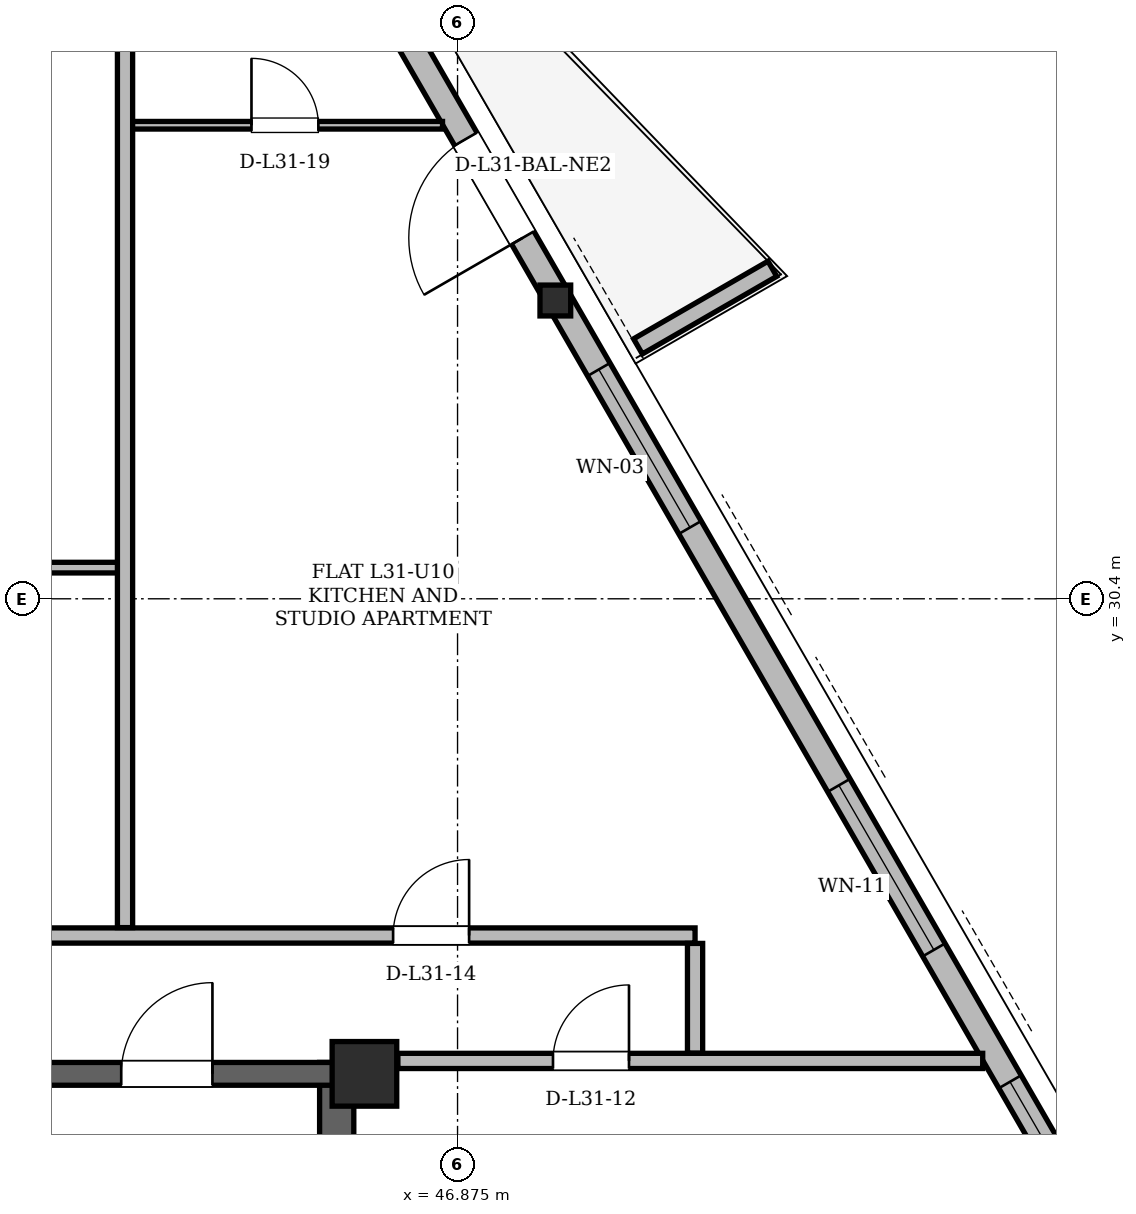
"""IFC4 building model, lengths in metres.
Left out: names, types, materials, properties, quantities, classifications, styles, units other than length and angle.
Written with IfcOpenShell. Run it as: python <this file> out.ifc"""

import sys

from ifc_helpers import new_model, si_unit, direction, frame, frame_2d, origin, origin_2d, place, context, subcontext, project, spatial, polyline, rectangle, hollow_rectangle, i_section, outline, extrude, element, fill, save


model = new_model("IFC4")
c1 = context("Model", 3, precision=1e-05, world=origin(), true_north=direction((0.0, 1.0)))
c2 = subcontext(c1, "Body", "Model", "MODEL_VIEW")
j1 = project(units=[si_unit("LENGTHUNIT", "METRE"), si_unit("PLANEANGLEUNIT", "RADIAN")], contexts=[c1])
p1 = place(None, origin())
s1 = spatial("IfcSite", under=j1, at=p1, CompositionType="ELEMENT")
p2 = place(p1, origin())
s2 = spatial("IfcBuilding", under=s1, at=p2, CompositionType="ELEMENT")
p3 = place(p2, frame((0.0, 0.0, 119.4)))
s3 = spatial("IfcBuildingStorey", under=s2, at=p3, CompositionType="ELEMENT", Elevation=119.4)
p4 = place(p3, frame((45.65, 24.15, 0.0), z_axis=(0.0, 0.0, 1.0), x_axis=(1.0, 0.0, 0.0)))
e1 = element("IfcColumn", 1, at=p4, inside=s3, PredefinedType="COLUMN", context=c2, shape_type="SweptSolid", body=[
    extrude(hollow_rectangle(XDim=0.85, YDim=0.85, WallThickness=0.07, at=origin_2d()), origin(), (0.0, 0.0, 1.0), 3.6),
])
p5 = place(p3, frame((48.201, 34.338, 0.005), z_axis=(-0.022089225815, -0.007952121293, 0.999724376951), x_axis=(0.338719468273, -0.940887411869, 0.0)))
e2 = element("IfcColumn", 2, at=p5, inside=s3, PredefinedType="COLUMN", context=c2, shape_type="SweptSolid", body=[
    extrude(i_section(OverallWidth=0.404, OverallDepth=0.406, WebThickness=0.027, FlangeThickness=0.044, at=origin_2d()), origin(), (0.0, 0.0, 1.0), 3.592),
])
p6 = place(p3, frame((45.285, 11.0, 0.0), z_axis=(0.0, 0.0, 1.0), x_axis=(0.0, 1.0, 0.0)))
e3 = element("IfcWall", 3, at=p6, inside=s3, PredefinedType="SHEAR", context=c2, shape_type="SweptSolid", body=[
    extrude(rectangle(XDim=13.3, YDim=0.45, at=frame_2d((6.65, 0.0))), origin(), (0.0, 0.0, 1.0), 3.36),
])
p7 = place(p3, frame((29.65, 24.15, 0.0), z_axis=(0.0, 0.0, 1.0), x_axis=(1.0, 0.0, 0.0)))
e4 = element("IfcWall", 4, at=p7, inside=s3, PredefinedType="SHEAR", context=c2, shape_type="SweptSolid", body=[
    extrude(rectangle(XDim=15.7, YDim=0.3, at=frame_2d((7.85, 0.0))), origin(), (0.0, 0.0, 1.0), 3.36),
])
p8 = place(p7, frame((1.7, 0.0, 0.0)))
e5 = element("IfcOpeningElement", 5, at=p8, cuts=e4, PredefinedType="OPENING", context=c2, shape_type="SweptSolid", body=[
    extrude(rectangle(XDim=1.2, YDim=2.2, at=frame_2d((0.6, 1.1))), frame((0.0, 0.15, 0.0), z_axis=(0.0, -1.0, 0.0), x_axis=(1.0, 0.0, 0.0)), (0.0, 0.0, 1.0), 0.3),
])
p9 = place(p7, frame((12.8, 0.0, 0.0)))
e6 = element("IfcOpeningElement", 6, at=p9, cuts=e4, PredefinedType="OPENING", context=c2, shape_type="SweptSolid", body=[
    extrude(rectangle(XDim=1.2, YDim=2.2, at=frame_2d((0.6, 1.1))), frame((0.0, 0.15, 0.0), z_axis=(0.0, -1.0, 0.0), x_axis=(1.0, 0.0, 0.0)), (0.0, 0.0, 1.0), 0.3),
])
p10 = place(p7, frame((6.55, 0.0, 0.0)))
e7 = element("IfcOpeningElement", 7, at=p10, cuts=e4, PredefinedType="OPENING", context=c2, shape_type="SweptSolid", body=[
    extrude(rectangle(XDim=0.9, YDim=2.05, at=frame_2d((0.45, 1.025))), frame((0.0, 0.15, 0.0), z_axis=(0.0, -1.0, 0.0), x_axis=(1.0, 0.0, 0.0)), (0.0, 0.0, 1.0), 0.3),
])
p11 = place(p7, frame((8.45, 0.0, 0.0)))
e8 = element("IfcOpeningElement", 8, at=p11, cuts=e4, PredefinedType="OPENING", context=c2, shape_type="SweptSolid", body=[
    extrude(rectangle(XDim=0.9, YDim=2.05, at=frame_2d((0.45, 1.025))), frame((0.0, 0.15, 0.0), z_axis=(0.0, -1.0, 0.0), x_axis=(1.0, 0.0, 0.0)), (0.0, 0.0, 1.0), 0.3),
])
p12 = place(p3, frame((60.417, 13.181, 0.0), z_axis=(0.0, 0.0, 1.0), x_axis=(-0.499998569178, 0.866026229868, 0.0)))
e9 = element("IfcWall", 9, at=p12, inside=s3, PredefinedType="SOLIDWALL", context=c2, shape_type="SweptSolid", body=[
    extrude(rectangle(XDim=34.901, YDim=0.34, at=frame_2d((17.451, 0.0))), origin(), (0.0, 0.0, 1.0), 2.578),
])
p13 = place(p12, frame((6.369, 0.0, 0.0)))
e10 = element("IfcOpeningElement", 10, at=p13, cuts=e9, PredefinedType="OPENING", context=c2, shape_type="SweptSolid", body=[
    extrude(rectangle(XDim=1.5, YDim=2.2, at=frame_2d((0.75, 1.1))), frame((0.0, 0.17, 0.0), z_axis=(0.0, -1.0, 0.0), x_axis=(1.0, 0.0, 0.0)), (0.0, 0.0, 1.0), 0.34),
])
p14 = place(p12, frame((25.367, 0.0, 0.0)))
e11 = element("IfcOpeningElement", 11, at=p14, cuts=e9, PredefinedType="OPENING", context=c2, shape_type="SweptSolid", body=[
    extrude(rectangle(XDim=1.5, YDim=2.2, at=frame_2d((0.75, 1.1))), frame((0.0, 0.17, 0.0), z_axis=(0.0, -1.0, 0.0), x_axis=(1.0, 0.0, 0.0)), (0.0, 0.0, 1.0), 0.34),
])
p15 = place(p12, frame((3.309, 0.0, 0.85)))
e12 = element("IfcOpeningElement", 12, at=p15, cuts=e9, PredefinedType="OPENING", context=c2, shape_type="SweptSolid", body=[
    extrude(rectangle(XDim=1.2, YDim=1.48, at=frame_2d((0.6, 0.74))), frame((0.0, 0.17, 0.0), z_axis=(0.0, -1.0, 0.0), x_axis=(1.0, 0.0, 0.0)), (0.0, 0.0, 1.0), 0.34),
])
p16 = place(p12, frame((11.346, 0.0, 0.85)))
e13 = element("IfcOpeningElement", 13, at=p16, cuts=e9, PredefinedType="OPENING", context=c2, shape_type="SweptSolid", body=[
    extrude(rectangle(XDim=1.2, YDim=1.48, at=frame_2d((0.6, 0.74))), frame((0.0, 0.17, 0.0), z_axis=(0.0, -1.0, 0.0), x_axis=(1.0, 0.0, 0.0)), (0.0, 0.0, 1.0), 0.34),
])
p17 = place(p12, frame((32.719, 0.0, 0.85)))
e14 = element("IfcOpeningElement", 14, at=p17, cuts=e9, PredefinedType="OPENING", context=c2, shape_type="SweptSolid", body=[
    extrude(rectangle(XDim=1.2, YDim=1.48, at=frame_2d((0.6, 0.74))), frame((0.0, 0.17, 0.0), z_axis=(0.0, -1.0, 0.0), x_axis=(1.0, 0.0, 0.0)), (0.0, 0.0, 1.0), 0.34),
])
p18 = place(p12, frame((14.549, 0.0, 0.85)))
e15 = element("IfcOpeningElement", 15, at=p18, cuts=e9, PredefinedType="OPENING", context=c2, shape_type="SweptSolid", body=[
    extrude(rectangle(XDim=2.5, YDim=1.618, at=frame_2d((1.25, 0.809))), frame((0.0, 0.17, 0.0), z_axis=(0.0, -1.0, 0.0), x_axis=(1.0, 0.0, 0.0)), (0.0, 0.0, 1.0), 0.34),
])
p19 = place(p12, frame((20.967, 0.0, 0.85)))
e16 = element("IfcOpeningElement", 16, at=p19, cuts=e9, PredefinedType="OPENING", context=c2, shape_type="SweptSolid", body=[
    extrude(rectangle(XDim=2.4, YDim=1.618, at=frame_2d((1.2, 0.809))), frame((0.0, 0.17, 0.0), z_axis=(0.0, -1.0, 0.0), x_axis=(1.0, 0.0, 0.0)), (0.0, 0.0, 1.0), 0.34),
])
p20 = place(p12, frame((30.927, 0.0, 0.85)))
e17 = element("IfcOpeningElement", 17, at=p20, cuts=e9, PredefinedType="OPENING", context=c2, shape_type="SweptSolid", body=[
    extrude(rectangle(XDim=1.2, YDim=1.48, at=frame_2d((0.6, 0.74))), frame((0.0, 0.17, 0.0), z_axis=(0.0, -1.0, 0.0), x_axis=(1.0, 0.0, 0.0)), (0.0, 0.0, 1.0), 0.34),
])
p21 = place(p3, frame((49.249, 33.72, 0.0), z_axis=(0.0, 0.0, 1.0), x_axis=(0.866012356593, 0.500022597718, 0.0)))
e18 = element("IfcWall", 18, at=p21, inside=s3, PredefinedType="PARAPET", context=c2, shape_type="SweptSolid", body=[
    extrude(outline(polyline([(0.0, 0.0), (2.042, 0.0), (2.042, 1.1), (0.0, 1.32), (0.0, 0.0)])), frame((0.0, 0.115, 0.0), z_axis=(0.0, -1.0, 0.0), x_axis=(1.0, 0.0, 0.0)), (0.0, 0.0, 1.0), 0.23),
])
p22 = place(p3, frame((46.09, 24.32, 0.0), z_axis=(0.0, 0.0, 1.0), x_axis=(1.0, 0.0, 0.0)))
e19 = element("IfcWall", 19, at=p22, inside=s3, PredefinedType="PARTITIONING", context=c2, shape_type="SweptSolid", body=[
    extrude(rectangle(XDim=7.695, YDim=0.2, at=frame_2d((3.847, 0.0))), origin(), (0.0, 0.0, 1.0), 2.946),
])
p23 = place(p22, frame((2.041, 0.0, 0.0)))
e20 = element("IfcOpeningElement", 20, at=p23, cuts=e19, PredefinedType="OPENING", context=c2, shape_type="SweptSolid", body=[
    extrude(rectangle(XDim=1.0, YDim=2.18, at=frame_2d((0.5, 1.09))), frame((0.0, 0.1, 0.0), z_axis=(0.0, -1.0, 0.0), x_axis=(1.0, 0.0, 0.0)), (0.0, 0.0, 1.0), 0.2),
])
p24 = place(p3, frame((38.3, 25.97, 0.0), z_axis=(0.0, 0.0, 1.0), x_axis=(1.0, 0.0, 0.0)))
e21 = element("IfcWall", 21, at=p24, inside=s3, PredefinedType="PARTITIONING", context=c2, shape_type="SweptSolid", body=[
    extrude(rectangle(XDim=11.7, YDim=0.2, at=frame_2d((5.85, 0.0))), origin(), (0.0, 0.0, 1.0), 2.814),
])
p25 = place(p24, frame((7.727, 0.0, 0.0)))
e22 = element("IfcOpeningElement", 22, at=p25, cuts=e21, PredefinedType="OPENING", context=c2, shape_type="SweptSolid", body=[
    extrude(rectangle(XDim=1.0, YDim=2.18, at=frame_2d((0.5, 1.09))), frame((0.0, 0.1, 0.0), z_axis=(0.0, -1.0, 0.0), x_axis=(1.0, 0.0, 0.0)), (0.0, 0.0, 1.0), 0.2),
])
p26 = place(p3, frame((38.218, 30.81, 0.0), z_axis=(0.0, 0.0, 1.0), x_axis=(1.0, 0.0, 0.0)))
e23 = element("IfcWall", 23, at=p26, inside=s3, PredefinedType="PARTITIONING", context=c2, shape_type="SweptSolid", body=[
    extrude(rectangle(XDim=4.364, YDim=0.14, at=frame_2d((2.182, 0.0))), origin(), (0.0, 0.0, 1.0), 3.36),
])
p27 = place(p26, frame((1.742, 0.0, 0.0)))
e24 = element("IfcOpeningElement", 24, at=p27, cuts=e23, PredefinedType="OPENING", context=c2, shape_type="SweptSolid", body=[
    extrude(rectangle(XDim=0.88, YDim=2.08, at=frame_2d((0.44, 1.04))), frame((0.0, 0.07, 0.0), z_axis=(0.0, -1.0, 0.0), x_axis=(1.0, 0.0, 0.0)), (0.0, 0.0, 1.0), 0.14),
])
p28 = place(p3, frame((42.418, 36.63, 0.0), z_axis=(0.0, 0.0, 1.0), x_axis=(1.0, 0.0, 0.0)))
e25 = element("IfcWall", 25, at=p28, inside=s3, PredefinedType="PARTITIONING", context=c2, shape_type="SweptSolid", body=[
    extrude(rectangle(XDim=4.26, YDim=0.1, at=frame_2d((2.13, 0.0))), origin(), (0.0, 0.0, 1.0), 2.814),
])
p29 = place(p28, frame((1.746, 0.0, 0.0)))
e26 = element("IfcOpeningElement", 26, at=p29, cuts=e25, PredefinedType="OPENING", context=c2, shape_type="SweptSolid", body=[
    extrude(rectangle(XDim=0.88, YDim=2.08, at=frame_2d((0.44, 1.04))), frame((0.0, 0.05, 0.0), z_axis=(0.0, -1.0, 0.0), x_axis=(1.0, 0.0, 0.0)), (0.0, 0.0, 1.0), 0.1),
])
p30 = place(p3, frame((42.5, 26.074, 0.0), z_axis=(0.0, 0.0, 1.0), x_axis=(0.0, 1.0, 0.0)))
e27 = element("IfcWall", 27, at=p30, inside=s3, PredefinedType="PARTITIONING", context=c2, shape_type="SweptSolid", body=[
    extrude(rectangle(XDim=17.158, YDim=0.2, at=frame_2d((8.579, 0.0))), origin(), (0.0, 0.0, 1.0), 3.36),
])
p31 = place(p3, frame((50.0, 24.424, 0.0), z_axis=(0.0, 0.0, 1.0), x_axis=(0.0, 1.0, 0.0)))
e28 = element("IfcWall", 28, at=p31, inside=s3, PredefinedType="PARTITIONING", context=c2, shape_type="SweptSolid", body=[
    extrude(rectangle(XDim=1.442, YDim=0.2, at=frame_2d((0.721, 0.0))), origin(), (0.0, 0.0, 1.0), 3.36),
])
p32 = place(p14, origin())
e29 = element("IfcDoor", 29, at=p32, inside=s3, OperationType="SINGLE_SWING_LEFT", PredefinedType="DOOR", context=c2, shape_type="SweptSolid", body=[
    extrude(rectangle(XDim=1.5, YDim=2.2, at=frame_2d((0.75, 1.1))), frame((0.0, 0.025, 0.0), z_axis=(0.0, -1.0, 0.0), x_axis=(1.0, 0.0, 0.0)), (0.0, 0.0, 1.0), 0.05),
])
fill(e11, e29)
p33 = place(p16, origin())
e30 = element("IfcWindow", 30, at=p33, inside=s3, PartitioningType="SINGLE_PANEL", PredefinedType="WINDOW", context=c2, shape_type="SweptSolid", body=[
    extrude(rectangle(XDim=1.2, YDim=1.48, at=frame_2d((0.6, 0.74))), frame((0.0, 0.03, 0.0), z_axis=(0.0, -1.0, 0.0), x_axis=(1.0, 0.0, 0.0)), (0.0, 0.0, 1.0), 0.06),
])
fill(e13, e30)
p34 = place(p18, origin())
e31 = element("IfcWindow", 31, at=p34, inside=s3, PartitioningType="SINGLE_PANEL", PredefinedType="WINDOW", context=c2, shape_type="SweptSolid", body=[
    extrude(rectangle(XDim=2.5, YDim=1.618, at=frame_2d((1.25, 0.809))), frame((0.0, 0.03, 0.0), z_axis=(0.0, -1.0, 0.0), x_axis=(1.0, 0.0, 0.0)), (0.0, 0.0, 1.0), 0.06),
])
fill(e15, e31)
p35 = place(p19, origin())
e32 = element("IfcWindow", 32, at=p35, inside=s3, PartitioningType="SINGLE_PANEL", PredefinedType="WINDOW", context=c2, shape_type="SweptSolid", body=[
    extrude(rectangle(XDim=2.4, YDim=1.618, at=frame_2d((1.2, 0.809))), frame((0.0, 0.03, 0.0), z_axis=(0.0, -1.0, 0.0), x_axis=(1.0, 0.0, 0.0)), (0.0, 0.0, 1.0), 0.06),
])
fill(e16, e32)
p36 = place(p9, origin())
e33 = element("IfcDoor", 33, at=p36, inside=s3, OperationType="SINGLE_SWING_RIGHT", PredefinedType="DOOR", context=c2, shape_type="SweptSolid", body=[
    extrude(rectangle(XDim=1.2, YDim=2.2, at=frame_2d((0.6, 1.1))), frame((0.0, 0.025, 0.0), z_axis=(0.0, -1.0, 0.0), x_axis=(1.0, 0.0, 0.0)), (0.0, 0.0, 1.0), 0.05),
])
fill(e6, e33)
p37 = place(p23, origin())
e34 = element("IfcDoor", 34, at=p37, inside=s3, OperationType="SINGLE_SWING_RIGHT", PredefinedType="DOOR", context=c2, shape_type="SweptSolid", body=[
    extrude(rectangle(XDim=1.0, YDim=2.18, at=frame_2d((0.5, 1.09))), frame((0.0, 0.025, 0.0), z_axis=(0.0, -1.0, 0.0), x_axis=(1.0, 0.0, 0.0)), (0.0, 0.0, 1.0), 0.05),
])
fill(e20, e34)
p38 = place(p25, origin())
e35 = element("IfcDoor", 35, at=p38, inside=s3, OperationType="SINGLE_SWING_RIGHT", PredefinedType="DOOR", context=c2, shape_type="SweptSolid", body=[
    extrude(rectangle(XDim=1.0, YDim=2.18, at=frame_2d((0.5, 1.09))), frame((0.0, 0.025, 0.0), z_axis=(0.0, -1.0, 0.0), x_axis=(1.0, 0.0, 0.0)), (0.0, 0.0, 1.0), 0.05),
])
fill(e22, e35)
p39 = place(p29, origin())
e36 = element("IfcDoor", 36, at=p39, inside=s3, OperationType="SINGLE_SWING_LEFT", PredefinedType="DOOR", context=c2, shape_type="SweptSolid", body=[
    extrude(rectangle(XDim=0.88, YDim=2.08, at=frame_2d((0.44, 1.04))), frame((0.0, 0.025, 0.0), z_axis=(0.0, -1.0, 0.0), x_axis=(1.0, 0.0, 0.0)), (0.0, 0.0, 1.0), 0.05),
])
fill(e26, e36)
save(model, sys.argv[1])
